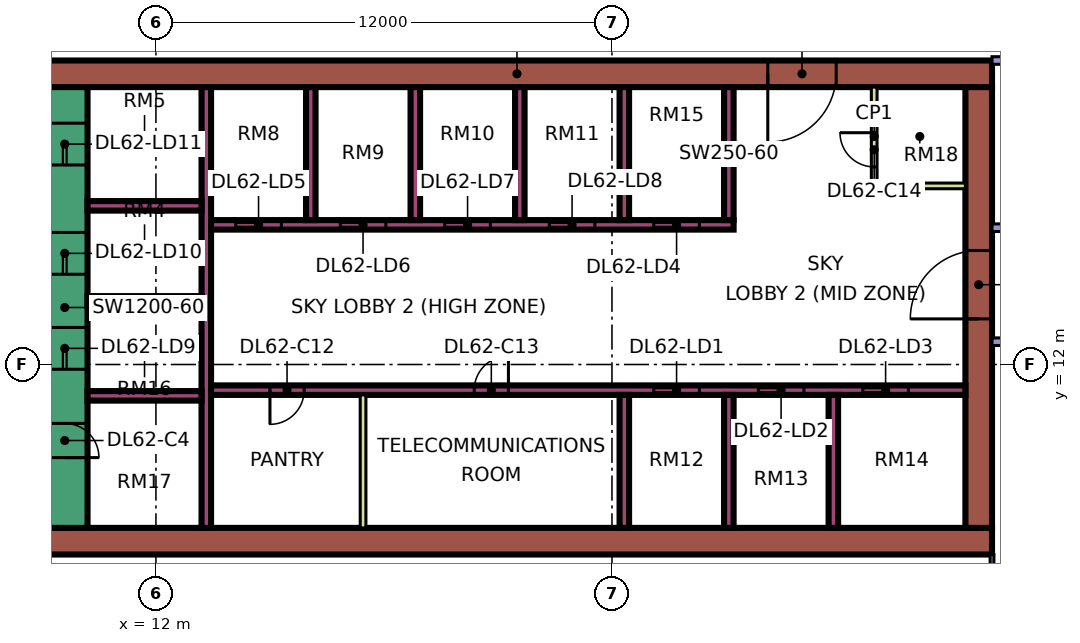
"""IFC4 building model, lengths in metres.
Left out: names, types, materials, properties, quantities, classifications, styles, units other than length and angle.
Written with IfcOpenShell. Run it as: python <this file> out.ifc"""

import sys

from ifc_helpers import new_model, si_unit, direction, frame, frame_2d, origin, place, context, subcontext, project, spatial, rectangle, extrude, element, fill, save


model = new_model("IFC4")
c1 = context("Model", 3, precision=1e-05, world=origin(), true_north=direction((0.0, 1.0)))
c2 = subcontext(c1, "Body", "Model", "MODEL_VIEW")
j1 = project(units=[si_unit("LENGTHUNIT", "METRE"), si_unit("PLANEANGLEUNIT", "RADIAN")], contexts=[c1])
p1 = place(None, origin())
s1 = spatial("IfcSite", under=j1, at=p1, CompositionType="ELEMENT")
p2 = place(p1, origin())
s2 = spatial("IfcBuilding", under=s1, at=p2, CompositionType="ELEMENT")
p3 = place(p2, frame((0.0, 0.0, 262.15)))
s3 = spatial("IfcBuildingStorey", under=s2, at=p3, CompositionType="ELEMENT", Elevation=262.15)
p4 = place(p3, frame((9.0, 7.35, 0.0), z_axis=(0.0, 0.0, 1.0), x_axis=(1.0, 0.0, 0.0)))
e1 = element("IfcWall", 1, at=p4, inside=s3, PredefinedType="SHEAR", context=c2, shape_type="SweptSolid", body=[
    extrude(rectangle(XDim=25.0, YDim=0.7, at=frame_2d((12.5, 0.0))), origin(), (0.0, 0.0, 1.0), 11.25),
])
p5 = place(p3, frame((9.0, 19.65, 0.0), z_axis=(0.0, 0.0, 1.0), x_axis=(1.0, 0.0, 0.0)))
e2 = element("IfcWall", 2, at=p5, inside=s3, PredefinedType="SHEAR", context=c2, shape_type="SweptSolid", body=[
    extrude(rectangle(XDim=25.0, YDim=0.7, at=frame_2d((12.5, 0.0))), origin(), (0.0, 0.0, 1.0), 11.25),
])
p6 = place(p5, frame((19.1, 0.0, 0.0)))
e3 = element("IfcOpeningElement", 3, at=p6, cuts=e2, PredefinedType="OPENING", context=c2, shape_type="SweptSolid", body=[
    extrude(rectangle(XDim=1.8, YDim=2.4, at=frame_2d((0.9, 1.2))), frame((0.0, 0.36, 0.0), z_axis=(0.0, -1.0, 0.0), x_axis=(1.0, 0.0, 0.0)), (0.0, 0.0, 1.0), 0.72),
])
p7 = place(p3, frame((9.6, 7.7, 0.0), z_axis=(0.0, 0.0, 1.0), x_axis=(0.0, 1.0, 0.0)))
e4 = element("IfcWall", 4, at=p7, inside=s3, PredefinedType="SHEAR", context=c2, shape_type="SweptSolid", body=[
    extrude(rectangle(XDim=11.6, YDim=1.2, at=frame_2d((5.8, 0.0))), origin(), (0.0, 0.0, 1.0), 11.25),
])
p8 = place(p7, frame((4.175, 0.0, 0.0)))
e5 = element("IfcOpeningElement", 5, at=p8, cuts=e4, PredefinedType="OPENING", context=c2, shape_type="SweptSolid", body=[
    extrude(rectangle(XDim=1.1, YDim=2.2, at=frame_2d((0.55, 1.1))), frame((0.0, 0.61, 0.0), z_axis=(0.0, -1.0, 0.0), x_axis=(1.0, 0.0, 0.0)), (0.0, 0.0, 1.0), 1.22),
])
p9 = place(p7, frame((6.675, 0.0, 0.0)))
e6 = element("IfcOpeningElement", 6, at=p9, cuts=e4, PredefinedType="OPENING", context=c2, shape_type="SweptSolid", body=[
    extrude(rectangle(XDim=1.1, YDim=2.2, at=frame_2d((0.55, 1.1))), frame((0.0, 0.61, 0.0), z_axis=(0.0, -1.0, 0.0), x_axis=(1.0, 0.0, 0.0)), (0.0, 0.0, 1.0), 1.22),
])
p10 = place(p7, frame((9.55, 0.0, 0.0)))
e7 = element("IfcOpeningElement", 7, at=p10, cuts=e4, PredefinedType="OPENING", context=c2, shape_type="SweptSolid", body=[
    extrude(rectangle(XDim=1.1, YDim=2.2, at=frame_2d((0.55, 1.1))), frame((0.0, 0.61, 0.0), z_axis=(0.0, -1.0, 0.0), x_axis=(1.0, 0.0, 0.0)), (0.0, 0.0, 1.0), 1.22),
])
p11 = place(p7, frame((1.85, 0.0, 0.0)))
e8 = element("IfcOpeningElement", 8, at=p11, cuts=e4, PredefinedType="OPENING", context=c2, shape_type="SweptSolid", body=[
    extrude(rectangle(XDim=0.9, YDim=2.1, at=frame_2d((0.45, 1.05))), frame((0.0, 0.61, 0.0), z_axis=(0.0, -1.0, 0.0), x_axis=(1.0, 0.0, 0.0)), (0.0, 0.0, 1.0), 1.22),
])
p12 = place(p3, frame((33.65, 7.7, 0.0), z_axis=(0.0, 0.0, 1.0), x_axis=(0.0, 1.0, 0.0)))
e9 = element("IfcWall", 9, at=p12, inside=s3, PredefinedType="SHEAR", context=c2, shape_type="SweptSolid", body=[
    extrude(rectangle(XDim=11.6, YDim=0.7, at=frame_2d((5.8, 0.0))), origin(), (0.0, 0.0, 1.0), 11.25),
])
p13 = place(p12, frame((5.5, 0.0, 0.0)))
e10 = element("IfcOpeningElement", 10, at=p13, cuts=e9, PredefinedType="OPENING", context=c2, shape_type="SweptSolid", body=[
    extrude(rectangle(XDim=1.8, YDim=2.4, at=frame_2d((0.9, 1.2))), frame((0.0, 0.36, 0.0), z_axis=(0.0, -1.0, 0.0), x_axis=(1.0, 0.0, 0.0)), (0.0, 0.0, 1.0), 0.72),
])
p14 = place(p3, frame((13.325, 7.7, 0.0), z_axis=(0.0, 0.0, 1.0), x_axis=(0.0, 1.0, 0.0)))
e11 = element("IfcWall", 11, at=p14, inside=s3, PredefinedType="SHEAR", context=c2, shape_type="SweptSolid", body=[
    extrude(rectangle(XDim=11.6, YDim=0.25, at=frame_2d((5.8, 0.0))), origin(), (0.0, 0.0, 1.0), 11.25),
])
p15 = place(p3, frame((13.45, 11.325, 0.0), z_axis=(0.0, 0.0, 1.0), x_axis=(1.0, 0.0, 0.0)))
e12 = element("IfcWall", 12, at=p15, inside=s3, PredefinedType="SHEAR", context=c2, shape_type="SweptSolid", body=[
    extrude(rectangle(XDim=19.85, YDim=0.25, at=frame_2d((9.925, 0.0))), origin(), (0.0, 0.0, 1.0), 11.25),
])
p16 = place(p15, frame((11.65, 0.0, 0.0)))
e13 = element("IfcOpeningElement", 13, at=p16, cuts=e12, PredefinedType="OPENING", context=c2, shape_type="SweptSolid", body=[
    extrude(rectangle(XDim=1.2, YDim=2.2, at=frame_2d((0.6, 1.1))), frame((0.0, 0.135, 0.0), z_axis=(0.0, -1.0, 0.0), x_axis=(1.0, 0.0, 0.0)), (0.0, 0.0, 1.0), 0.27),
])
p17 = place(p15, frame((14.4, 0.0, 0.0)))
e14 = element("IfcOpeningElement", 14, at=p17, cuts=e12, PredefinedType="OPENING", context=c2, shape_type="SweptSolid", body=[
    extrude(rectangle(XDim=1.2, YDim=2.2, at=frame_2d((0.6, 1.1))), frame((0.0, 0.135, 0.0), z_axis=(0.0, -1.0, 0.0), x_axis=(1.0, 0.0, 0.0)), (0.0, 0.0, 1.0), 0.27),
])
p18 = place(p15, frame((17.15, 0.0, 0.0)))
e15 = element("IfcOpeningElement", 15, at=p18, cuts=e12, PredefinedType="OPENING", context=c2, shape_type="SweptSolid", body=[
    extrude(rectangle(XDim=1.2, YDim=2.2, at=frame_2d((0.6, 1.1))), frame((0.0, 0.135, 0.0), z_axis=(0.0, -1.0, 0.0), x_axis=(1.0, 0.0, 0.0)), (0.0, 0.0, 1.0), 0.27),
])
p19 = place(p15, frame((1.55, 0.0, 0.0)))
e16 = element("IfcOpeningElement", 16, at=p19, cuts=e12, PredefinedType="OPENING", context=c2, shape_type="SweptSolid", body=[
    extrude(rectangle(XDim=0.9, YDim=2.1, at=frame_2d((0.45, 1.05))), frame((0.0, 0.135, 0.0), z_axis=(0.0, -1.0, 0.0), x_axis=(1.0, 0.0, 0.0)), (0.0, 0.0, 1.0), 0.27),
])
p20 = place(p15, frame((6.925, 0.0, 0.0)))
e17 = element("IfcOpeningElement", 17, at=p20, cuts=e12, PredefinedType="OPENING", context=c2, shape_type="SweptSolid", body=[
    extrude(rectangle(XDim=0.9, YDim=2.1, at=frame_2d((0.45, 1.05))), frame((0.0, 0.135, 0.0), z_axis=(0.0, -1.0, 0.0), x_axis=(1.0, 0.0, 0.0)), (0.0, 0.0, 1.0), 0.27),
])
p21 = place(p3, frame((13.45, 15.675, 0.0), z_axis=(0.0, 0.0, 1.0), x_axis=(1.0, 0.0, 0.0)))
e18 = element("IfcWall", 18, at=p21, inside=s3, PredefinedType="SHEAR", context=c2, shape_type="SweptSolid", body=[
    extrude(rectangle(XDim=13.75, YDim=0.25, at=frame_2d((6.875, 0.0))), origin(), (0.0, 0.0, 1.0), 11.25),
])
p22 = place(p21, frame((11.65, 0.0, 0.0)))
e19 = element("IfcOpeningElement", 19, at=p22, cuts=e18, PredefinedType="OPENING", context=c2, shape_type="SweptSolid", body=[
    extrude(rectangle(XDim=1.2, YDim=2.2, at=frame_2d((0.6, 1.1))), frame((0.0, 0.135, 0.0), z_axis=(0.0, -1.0, 0.0), x_axis=(1.0, 0.0, 0.0)), (0.0, 0.0, 1.0), 0.27),
])
p23 = place(p21, frame((0.65, 0.0, 0.0)))
e20 = element("IfcOpeningElement", 20, at=p23, cuts=e18, PredefinedType="OPENING", context=c2, shape_type="SweptSolid", body=[
    extrude(rectangle(XDim=1.2, YDim=2.2, at=frame_2d((0.6, 1.1))), frame((0.0, 0.135, 0.0), z_axis=(0.0, -1.0, 0.0), x_axis=(1.0, 0.0, 0.0)), (0.0, 0.0, 1.0), 0.27),
])
p24 = place(p21, frame((3.4, 0.0, 0.0)))
e21 = element("IfcOpeningElement", 21, at=p24, cuts=e18, PredefinedType="OPENING", context=c2, shape_type="SweptSolid", body=[
    extrude(rectangle(XDim=1.2, YDim=2.2, at=frame_2d((0.6, 1.1))), frame((0.0, 0.135, 0.0), z_axis=(0.0, -1.0, 0.0), x_axis=(1.0, 0.0, 0.0)), (0.0, 0.0, 1.0), 0.27),
])
p25 = place(p21, frame((6.15, 0.0, 0.0)))
e22 = element("IfcOpeningElement", 22, at=p25, cuts=e18, PredefinedType="OPENING", context=c2, shape_type="SweptSolid", body=[
    extrude(rectangle(XDim=1.2, YDim=2.2, at=frame_2d((0.6, 1.1))), frame((0.0, 0.135, 0.0), z_axis=(0.0, -1.0, 0.0), x_axis=(1.0, 0.0, 0.0)), (0.0, 0.0, 1.0), 0.27),
])
p26 = place(p21, frame((8.9, 0.0, 0.0)))
e23 = element("IfcOpeningElement", 23, at=p26, cuts=e18, PredefinedType="OPENING", context=c2, shape_type="SweptSolid", body=[
    extrude(rectangle(XDim=1.2, YDim=2.2, at=frame_2d((0.6, 1.1))), frame((0.0, 0.135, 0.0), z_axis=(0.0, -1.0, 0.0), x_axis=(1.0, 0.0, 0.0)), (0.0, 0.0, 1.0), 0.27),
])
for number, where, z_axis, x_axis in (
    (24, (10.2, 11.175, 0.0), (0.0, 0.0, 1.0), (1.0, 0.0, 0.0)),
    (25, (10.2, 13.675, 0.0), (0.0, 0.0, 1.0), (1.0, 0.0, 0.0)),
    (26, (10.2, 16.175, 0.0), (0.0, 0.0, 1.0), (1.0, 0.0, 0.0)),
):
    element("IfcWall", number, at=place(p3, frame(where, z_axis=z_axis, x_axis=x_axis)), inside=s3, PredefinedType="SHEAR", context=c2, shape_type="SweptSolid", body=[
        extrude(rectangle(XDim=3.0, YDim=0.25, at=frame_2d((1.5, 0.0))), origin(), (0.0, 0.0, 1.0), 11.25),
    ])
for number, where, z_axis, x_axis in (
    (27, (24.325, 7.7, 0.0), (0.0, 0.0, 1.0), (0.0, 1.0, 0.0)),
    (28, (27.075, 7.7, 0.0), (0.0, 0.0, 1.0), (0.0, 1.0, 0.0)),
    (29, (29.825, 7.7, 0.0), (0.0, 0.0, 1.0), (0.0, 1.0, 0.0)),
    (30, (16.075, 15.8, 0.0), (0.0, 0.0, 1.0), (0.0, 1.0, 0.0)),
    (31, (18.825, 15.8, 0.0), (0.0, 0.0, 1.0), (0.0, 1.0, 0.0)),
    (32, (21.575, 15.8, 0.0), (0.0, 0.0, 1.0), (0.0, 1.0, 0.0)),
    (33, (24.325, 15.8, 0.0), (0.0, 0.0, 1.0), (0.0, 1.0, 0.0)),
    (34, (27.075, 15.8, 0.0), (0.0, 0.0, 1.0), (0.0, 1.0, 0.0)),
):
    element("IfcWall", number, at=place(p3, frame(where, z_axis=z_axis, x_axis=x_axis)), inside=s3, PredefinedType="SHEAR", context=c2, shape_type="SweptSolid", body=[
        extrude(rectangle(XDim=3.5, YDim=0.25, at=frame_2d((1.75, 0.0))), origin(), (0.0, 0.0, 1.0), 11.25),
    ])
p27 = place(p3, frame((-1.447, 12.553, 0.0), z_axis=(0.0, 0.0, 1.0), x_axis=(0.707106781187, -0.707106781187, 0.0)))
e35 = element("IfcWall", 35, at=p27, inside=s3, PredefinedType="SOLIDWALL", context=c2, shape_type="SweptSolid", body=[
    extrude(rectangle(XDim=19.799, YDim=0.15, at=frame_2d((9.899, 0.0))), origin(), (0.0, 0.0, 1.0), 10.85),
])
p28 = place(p27, frame((8.399, 0.0, 0.45)))
e36 = element("IfcOpeningElement", 36, at=p28, cuts=e35, PredefinedType="OPENING", context=c2, shape_type="SweptSolid", body=[
    extrude(rectangle(XDim=3.0, YDim=9.8, at=frame_2d((1.5, 4.9))), frame((0.0, 0.085, 0.0), z_axis=(0.0, -1.0, 0.0), x_axis=(1.0, 0.0, 0.0)), (0.0, 0.0, 1.0), 0.17),
])
p29 = place(p3, frame((17.45, 7.7, 0.0), z_axis=(0.0, 0.0, 1.0), x_axis=(0.0, 1.0, 0.0)))
e37 = element("IfcWall", 37, at=p29, inside=s3, PredefinedType="PARTITIONING", context=c2, shape_type="SweptSolid", body=[
    extrude(rectangle(XDim=3.5, YDim=0.15, at=frame_2d((1.75, 0.0))), origin(), (0.0, 0.0, 1.0), 10.85),
])
p30 = place(p3, frame((30.9, 16.7, 0.0), z_axis=(0.0, 0.0, 1.0), x_axis=(0.0, 1.0, 0.0)))
e38 = element("IfcWall", 38, at=p30, inside=s3, PredefinedType="PARTITIONING", context=c2, shape_type="SweptSolid", body=[
    extrude(rectangle(XDim=2.6, YDim=0.15, at=frame_2d((1.3, 0.0))), origin(), (0.0, 0.0, 1.0), 10.85),
])
p31 = place(p30, frame((0.5, 0.0, 0.0)))
e39 = element("IfcOpeningElement", 39, at=p31, cuts=e38, PredefinedType="OPENING", context=c2, shape_type="SweptSolid", body=[
    extrude(rectangle(XDim=0.9, YDim=2.1, at=frame_2d((0.45, 1.05))), frame((0.0, 0.085, 0.0), z_axis=(0.0, -1.0, 0.0), x_axis=(1.0, 0.0, 0.0)), (0.0, 0.0, 1.0), 0.17),
])
p32 = place(p3, frame((30.9, 16.7, 0.0), z_axis=(0.0, 0.0, 1.0), x_axis=(1.0, 0.0, 0.0)))
e40 = element("IfcWall", 40, at=p32, inside=s3, PredefinedType="PARTITIONING", context=c2, shape_type="SweptSolid", body=[
    extrude(rectangle(XDim=2.4, YDim=0.15, at=frame_2d((1.2, 0.0))), origin(), (0.0, 0.0, 1.0), 10.85),
])
p33 = place(p3, frame((34.0, 0.0, 0.0), z_axis=(0.0, 0.0, 1.0), x_axis=(0.0, 1.0, 0.0)))
e41 = element("IfcWall", 41, at=p33, inside=s3, PredefinedType="PARTITIONING", context=c2, shape_type="SweptSolid", body=[
    extrude(rectangle(XDim=7.0, YDim=0.1, at=frame_2d((3.5, 0.0))), origin(), (0.0, 0.0, 1.0), 10.85),
])
p34 = place(p3, frame((34.0, 12.6, 0.0), z_axis=(0.0, 0.0, 1.0), x_axis=(1.0, 0.0, 0.0)))
e42 = element("IfcWall", 42, at=p34, inside=s3, PredefinedType="PARTITIONING", context=c2, shape_type="SweptSolid", body=[
    extrude(rectangle(XDim=3.2, YDim=0.2, at=frame_2d((1.6, 0.0))), origin(), (0.0, 0.0, 1.0), 10.85),
])
p35 = place(p3, frame((34.0, 15.6, 0.0), z_axis=(0.0, 0.0, 1.0), x_axis=(1.0, 0.0, 0.0)))
e43 = element("IfcWall", 43, at=p35, inside=s3, PredefinedType="PARTITIONING", context=c2, shape_type="SweptSolid", body=[
    extrude(rectangle(XDim=10.35, YDim=0.2, at=frame_2d((5.175, 0.0))), origin(), (0.0, 0.0, 1.0), 10.85),
])
p36 = place(p35, frame((4.6, 0.0, 0.0)))
e44 = element("IfcOpeningElement", 44, at=p36, cuts=e43, PredefinedType="OPENING", context=c2, shape_type="SweptSolid", body=[
    extrude(rectangle(XDim=1.0, YDim=2.1, at=frame_2d((0.5, 1.05))), frame((0.0, 0.11, 0.0), z_axis=(0.0, -1.0, 0.0), x_axis=(1.0, 0.0, 0.0)), (0.0, 0.0, 1.0), 0.22),
])
p37 = place(p3, frame((34.0, 20.0, 0.0), z_axis=(0.0, 0.0, 1.0), x_axis=(1.0, 0.0, 0.0)))
e45 = element("IfcWall", 45, at=p37, inside=s3, PredefinedType="PARTITIONING", context=c2, shape_type="SweptSolid", body=[
    extrude(rectangle(XDim=1.9, YDim=0.2, at=frame_2d((0.95, 0.0))), origin(), (0.0, 0.0, 1.0), 10.85),
])
p38 = place(p16, origin())
e46 = element("IfcDoor", 46, at=p38, inside=s3, OperationType="DOUBLE_DOOR_SLIDING", PredefinedType="DOOR", context=c2, shape_type="SweptSolid", body=[
    extrude(rectangle(XDim=1.2, YDim=2.2, at=frame_2d((0.6, 1.1))), frame((0.0, 0.025, 0.0), z_axis=(0.0, -1.0, 0.0), x_axis=(1.0, 0.0, 0.0)), (0.0, 0.0, 1.0), 0.05),
])
fill(e13, e46)
p39 = place(p17, origin())
e47 = element("IfcDoor", 47, at=p39, inside=s3, OperationType="DOUBLE_DOOR_SLIDING", PredefinedType="DOOR", context=c2, shape_type="SweptSolid", body=[
    extrude(rectangle(XDim=1.2, YDim=2.2, at=frame_2d((0.6, 1.1))), frame((0.0, 0.025, 0.0), z_axis=(0.0, -1.0, 0.0), x_axis=(1.0, 0.0, 0.0)), (0.0, 0.0, 1.0), 0.05),
])
fill(e14, e47)
p40 = place(p18, origin())
e48 = element("IfcDoor", 48, at=p40, inside=s3, OperationType="DOUBLE_DOOR_SLIDING", PredefinedType="DOOR", context=c2, shape_type="SweptSolid", body=[
    extrude(rectangle(XDim=1.2, YDim=2.2, at=frame_2d((0.6, 1.1))), frame((0.0, 0.025, 0.0), z_axis=(0.0, -1.0, 0.0), x_axis=(1.0, 0.0, 0.0)), (0.0, 0.0, 1.0), 0.05),
])
fill(e15, e48)
p41 = place(p22, origin())
e49 = element("IfcDoor", 49, at=p41, inside=s3, OperationType="DOUBLE_DOOR_SLIDING", PredefinedType="DOOR", context=c2, shape_type="SweptSolid", body=[
    extrude(rectangle(XDim=1.2, YDim=2.2, at=frame_2d((0.6, 1.1))), frame((0.0, 0.025, 0.0), z_axis=(0.0, -1.0, 0.0), x_axis=(1.0, 0.0, 0.0)), (0.0, 0.0, 1.0), 0.05),
])
fill(e19, e49)
p42 = place(p23, origin())
e50 = element("IfcDoor", 50, at=p42, inside=s3, OperationType="DOUBLE_DOOR_SLIDING", PredefinedType="DOOR", context=c2, shape_type="SweptSolid", body=[
    extrude(rectangle(XDim=1.2, YDim=2.2, at=frame_2d((0.6, 1.1))), frame((0.0, 0.025, 0.0), z_axis=(0.0, -1.0, 0.0), x_axis=(1.0, 0.0, 0.0)), (0.0, 0.0, 1.0), 0.05),
])
fill(e20, e50)
p43 = place(p24, origin())
e51 = element("IfcDoor", 51, at=p43, inside=s3, OperationType="DOUBLE_DOOR_SLIDING", PredefinedType="DOOR", context=c2, shape_type="SweptSolid", body=[
    extrude(rectangle(XDim=1.2, YDim=2.2, at=frame_2d((0.6, 1.1))), frame((0.0, 0.025, 0.0), z_axis=(0.0, -1.0, 0.0), x_axis=(1.0, 0.0, 0.0)), (0.0, 0.0, 1.0), 0.05),
])
fill(e21, e51)
p44 = place(p25, origin())
e52 = element("IfcDoor", 52, at=p44, inside=s3, OperationType="DOUBLE_DOOR_SLIDING", PredefinedType="DOOR", context=c2, shape_type="SweptSolid", body=[
    extrude(rectangle(XDim=1.2, YDim=2.2, at=frame_2d((0.6, 1.1))), frame((0.0, 0.025, 0.0), z_axis=(0.0, -1.0, 0.0), x_axis=(1.0, 0.0, 0.0)), (0.0, 0.0, 1.0), 0.05),
])
fill(e22, e52)
p45 = place(p26, origin())
e53 = element("IfcDoor", 53, at=p45, inside=s3, OperationType="DOUBLE_DOOR_SLIDING", PredefinedType="DOOR", context=c2, shape_type="SweptSolid", body=[
    extrude(rectangle(XDim=1.2, YDim=2.2, at=frame_2d((0.6, 1.1))), frame((0.0, 0.025, 0.0), z_axis=(0.0, -1.0, 0.0), x_axis=(1.0, 0.0, 0.0)), (0.0, 0.0, 1.0), 0.05),
])
fill(e23, e53)
p46 = place(p8, origin())
e54 = element("IfcDoor", 54, at=p46, inside=s3, OperationType="DOUBLE_DOOR_SLIDING", PredefinedType="DOOR", context=c2, shape_type="SweptSolid", body=[
    extrude(rectangle(XDim=1.1, YDim=2.2, at=frame_2d((0.55, 1.1))), frame((0.0, 0.025, 0.0), z_axis=(0.0, -1.0, 0.0), x_axis=(1.0, 0.0, 0.0)), (0.0, 0.0, 1.0), 0.05),
])
fill(e5, e54)
p47 = place(p9, origin())
e55 = element("IfcDoor", 55, at=p47, inside=s3, OperationType="DOUBLE_DOOR_SLIDING", PredefinedType="DOOR", context=c2, shape_type="SweptSolid", body=[
    extrude(rectangle(XDim=1.1, YDim=2.2, at=frame_2d((0.55, 1.1))), frame((0.0, 0.025, 0.0), z_axis=(0.0, -1.0, 0.0), x_axis=(1.0, 0.0, 0.0)), (0.0, 0.0, 1.0), 0.05),
])
fill(e6, e55)
p48 = place(p10, origin())
e56 = element("IfcDoor", 56, at=p48, inside=s3, OperationType="DOUBLE_DOOR_SLIDING", PredefinedType="DOOR", context=c2, shape_type="SweptSolid", body=[
    extrude(rectangle(XDim=1.1, YDim=2.2, at=frame_2d((0.55, 1.1))), frame((0.0, 0.025, 0.0), z_axis=(0.0, -1.0, 0.0), x_axis=(1.0, 0.0, 0.0)), (0.0, 0.0, 1.0), 0.05),
])
fill(e7, e56)
p49 = place(p13, origin())
e57 = element("IfcDoor", 57, at=p49, inside=s3, OperationType="DOUBLE_DOOR_SINGLE_SWING", PredefinedType="DOOR", context=c2, shape_type="SweptSolid", body=[
    extrude(rectangle(XDim=1.8, YDim=2.4, at=frame_2d((0.9, 1.2))), frame((0.0, 0.025, 0.0), z_axis=(0.0, -1.0, 0.0), x_axis=(1.0, 0.0, 0.0)), (0.0, 0.0, 1.0), 0.05),
])
fill(e10, e57)
p50 = place(p6, frame((1.8, 0.0, 0.0), z_axis=(0.0, 0.0, 1.0), x_axis=(-1.0, 0.0, 0.0)))
e58 = element("IfcDoor", 58, at=p50, inside=s3, OperationType="DOUBLE_DOOR_SINGLE_SWING", PredefinedType="DOOR", context=c2, shape_type="SweptSolid", body=[
    extrude(rectangle(XDim=1.8, YDim=2.4, at=frame_2d((0.9, 1.2))), frame((0.0, 0.025, 0.0), z_axis=(0.0, -1.0, 0.0), x_axis=(1.0, 0.0, 0.0)), (0.0, 0.0, 1.0), 0.05),
])
fill(e3, e58)
p51 = place(p11, frame((0.9, 0.0, 0.0), z_axis=(0.0, 0.0, 1.0), x_axis=(-1.0, 0.0, 0.0)))
e59 = element("IfcDoor", 59, at=p51, inside=s3, OperationType="SINGLE_SWING_LEFT", PredefinedType="DOOR", context=c2, shape_type="SweptSolid", body=[
    extrude(rectangle(XDim=0.9, YDim=2.1, at=frame_2d((0.45, 1.05))), frame((0.0, 0.025, 0.0), z_axis=(0.0, -1.0, 0.0), x_axis=(1.0, 0.0, 0.0)), (0.0, 0.0, 1.0), 0.05),
])
fill(e8, e59)
p52 = place(p19, frame((0.9, 0.0, 0.0), z_axis=(0.0, 0.0, 1.0), x_axis=(-1.0, 0.0, 0.0)))
e60 = element("IfcDoor", 60, at=p52, inside=s3, OperationType="SINGLE_SWING_LEFT", PredefinedType="DOOR", context=c2, shape_type="SweptSolid", body=[
    extrude(rectangle(XDim=0.9, YDim=2.1, at=frame_2d((0.45, 1.05))), frame((0.0, 0.025, 0.0), z_axis=(0.0, -1.0, 0.0), x_axis=(1.0, 0.0, 0.0)), (0.0, 0.0, 1.0), 0.05),
])
fill(e16, e60)
p53 = place(p20, frame((0.9, 0.0, 0.0), z_axis=(0.0, 0.0, 1.0), x_axis=(-1.0, 0.0, 0.0)))
e61 = element("IfcDoor", 61, at=p53, inside=s3, OperationType="SINGLE_SWING_RIGHT", PredefinedType="DOOR", context=c2, shape_type="SweptSolid", body=[
    extrude(rectangle(XDim=0.9, YDim=2.1, at=frame_2d((0.45, 1.05))), frame((0.0, 0.025, 0.0), z_axis=(0.0, -1.0, 0.0), x_axis=(1.0, 0.0, 0.0)), (0.0, 0.0, 1.0), 0.05),
])
fill(e17, e61)
p54 = place(p31, frame((0.9, 0.0, 0.0), z_axis=(0.0, 0.0, 1.0), x_axis=(-1.0, 0.0, 0.0)))
e62 = element("IfcDoor", 62, at=p54, inside=s3, OperationType="SINGLE_SWING_RIGHT", PredefinedType="DOOR", context=c2, shape_type="SweptSolid", body=[
    extrude(rectangle(XDim=0.9, YDim=2.1, at=frame_2d((0.45, 1.05))), frame((0.0, 0.025, 0.0), z_axis=(0.0, -1.0, 0.0), x_axis=(1.0, 0.0, 0.0)), (0.0, 0.0, 1.0), 0.05),
])
fill(e39, e62)
save(model, sys.argv[1])
